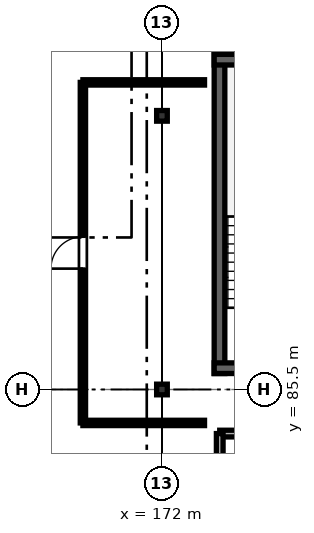
"""IFC4 building model, lengths in metres.
Left out: names, types, materials, properties, quantities, classifications, styles, units other than length and angle.
Written with IfcOpenShell. Run it as: python <this file> out.ifc"""

import sys

from ifc_helpers import new_model, si_unit, direction, frame, frame_2d, origin, origin_2d, place, context, subcontext, project, spatial, rectangle, i_section, extrude, element, fill, save


model = new_model("IFC4")
c1 = context("Model", 3, precision=1e-05, world=origin(), true_north=direction((0.0, 1.0)))
c2 = subcontext(c1, "Body", "Model", "MODEL_VIEW")
j1 = project(units=[si_unit("LENGTHUNIT", "METRE"), si_unit("PLANEANGLEUNIT", "RADIAN")], contexts=[c1])
p1 = place(None, origin())
s1 = spatial("IfcSite", under=j1, at=p1, CompositionType="ELEMENT")
p2 = place(p1, origin())
s2 = spatial("IfcBuilding", under=s1, at=p2, CompositionType="ELEMENT")
p3 = place(p2, frame((0.0, 0.0, 17.6)))
s3 = spatial("IfcBuildingStorey", under=s2, at=p3, CompositionType="ELEMENT", Elevation=17.6)
for number, where, z_axis, x_axis in (
    (1, (172.0, 85.5, 0.0), (0.0, 0.0, 1.0), (1.0, 0.0, 0.0)),
    (2, (172.0, 94.5, 0.0), (0.0, 0.0, 1.0), (1.0, 0.0, 0.0)),
):
    element("IfcColumn", number, at=place(p3, frame(where, z_axis=z_axis, x_axis=x_axis)), inside=s3, PredefinedType="COLUMN", context=c2, shape_type="SweptSolid", body=[
        extrude(i_section(OverallWidth=0.35, OverallDepth=0.35, WebThickness=0.012, FlangeThickness=0.019, FilletRadius=0.02, at=origin_2d()), origin(), (0.0, 0.0, 1.0), 3.2),
    ])
p4 = place(p3, frame((173.893, 96.522, 0.0), z_axis=(0.0, 0.0, 1.0), x_axis=(0.0, -1.0, 0.0)))
e3 = element("IfcWall", 3, at=p4, inside=s3, PredefinedType="SHEAR", context=c2, shape_type="SweptSolid", body=[
    extrude(rectangle(XDim=10.498, YDim=0.35, at=frame_2d((5.249, 0.0))), origin(), (0.0, 0.0, 1.0), 2.98),
])
p5 = place(p3, frame((178.038, 96.347, 0.0), z_axis=(0.0, 0.0, 1.0), x_axis=(-1.0, 0.0, 0.0)))
e4 = element("IfcWall", 4, at=p5, inside=s3, PredefinedType="SHEAR", context=c2, shape_type="SweptSolid", body=[
    extrude(rectangle(XDim=4.32, YDim=0.35, at=frame_2d((2.16, 0.0))), origin(), (0.0, 0.0, 1.0), 2.98),
])
p6 = place(p3, frame((173.718, 86.2, 0.0), z_axis=(0.0, 0.0, 1.0), x_axis=(1.0, 0.0, 0.0)))
e5 = element("IfcWall", 5, at=p6, inside=s3, PredefinedType="SHEAR", context=c2, shape_type="SweptSolid", body=[
    extrude(rectangle(XDim=4.32, YDim=0.35, at=frame_2d((2.16, 0.0))), origin(), (0.0, 0.0, 1.0), 2.98),
])
p7 = place(p6, frame((1.15, 0.0, 0.0)))
e6 = element("IfcOpeningElement", 6, at=p7, cuts=e5, PredefinedType="OPENING", context=c2, shape_type="SweptSolid", body=[
    extrude(rectangle(XDim=1.3, YDim=2.1, at=frame_2d((0.65, 1.05))), frame((0.0, 0.185, 0.0), z_axis=(0.0, -1.0, 0.0), x_axis=(1.0, 0.0, 0.0)), (0.0, 0.0, 1.0), 0.37),
])
for number, where, z_axis, x_axis in (
    (7, (173.4, 84.4, 0.0), (0.0, 0.0, 1.0), (-1.0, 0.0, 0.0)),
    (8, (169.4, 95.6, 0.0), (0.0, 0.0, 1.0), (1.0, 0.0, 0.0)),
):
    element("IfcWall", number, at=place(p3, frame(where, z_axis=z_axis, x_axis=x_axis)), inside=s3, PredefinedType="PARTITIONING", context=c2, shape_type="SweptSolid", body=[
        extrude(rectangle(XDim=4.0, YDim=0.175, at=frame_2d((2.0, 0.0))), origin(), (0.0, 0.0, 1.0), 2.565),
    ])
p8 = place(p3, frame((169.4, 84.4, 0.0), z_axis=(0.0, 0.0, 1.0), x_axis=(0.0, 1.0, 0.0)))
e9 = element("IfcWall", 9, at=p8, inside=s3, PredefinedType="PARTITIONING", context=c2, shape_type="SweptSolid", body=[
    extrude(rectangle(XDim=11.2, YDim=0.175, at=frame_2d((5.6, 0.0))), origin(), (0.0, 0.0, 1.0), 2.515),
])
p9 = place(p8, frame((5.075, 0.0, 0.0)))
e10 = element("IfcOpeningElement", 10, at=p9, cuts=e9, PredefinedType="OPENING", context=c2, shape_type="SweptSolid", body=[
    extrude(rectangle(XDim=1.05, YDim=2.1, at=frame_2d((0.525, 1.05))), frame((0.0, 0.097, 0.0), z_axis=(0.0, -1.0, 0.0), x_axis=(1.0, 0.0, 0.0)), (0.0, 0.0, 1.0), 0.195),
])
p10 = place(p3, frame((173.9, 84.05, 0.0), z_axis=(0.0, 0.0, 1.0), x_axis=(1.0, 0.0, 0.0)))
e11 = element("IfcWall", 11, at=p10, inside=s3, PredefinedType="SOLIDWALL", context=c2, shape_type="SweptSolid", body=[
    extrude(rectangle(XDim=4.0, YDim=0.22, at=frame_2d((2.0, 0.0))), origin(), (0.0, 0.0, 1.0), 2.955),
])
p11 = place(p3, frame((173.9, 79.85, 0.0), z_axis=(0.0, 0.0, 1.0), x_axis=(0.0, 1.0, 0.0)))
e12 = element("IfcWall", 12, at=p11, inside=s3, PredefinedType="SOLIDWALL", context=c2, shape_type="SweptSolid", body=[
    extrude(rectangle(XDim=4.2, YDim=0.22, at=frame_2d((2.1, 0.0))), origin(), (0.0, 0.0, 1.0), 2.955),
])
p12 = place(p11, frame((1.4, 0.0, 0.0)))
e13 = element("IfcOpeningElement", 13, at=p12, cuts=e12, PredefinedType="OPENING", context=c2, shape_type="SweptSolid", body=[
    extrude(rectangle(XDim=1.4, YDim=2.1, at=frame_2d((0.7, 1.05))), frame((0.0, 0.12, 0.0), z_axis=(0.0, -1.0, 0.0), x_axis=(1.0, 0.0, 0.0)), (0.0, 0.0, 1.0), 0.24),
])
p13 = place(p9, origin())
e14 = element("IfcDoor", 14, at=p13, inside=s3, OperationType="SINGLE_SWING_LEFT", PredefinedType="DOOR", context=c2, shape_type="SweptSolid", body=[
    extrude(rectangle(XDim=1.05, YDim=2.1, at=frame_2d((0.525, 1.05))), frame((0.0, 0.025, 0.0), z_axis=(0.0, -1.0, 0.0), x_axis=(1.0, 0.0, 0.0)), (0.0, 0.0, 1.0), 0.05),
])
fill(e10, e14)
save(model, sys.argv[1])
